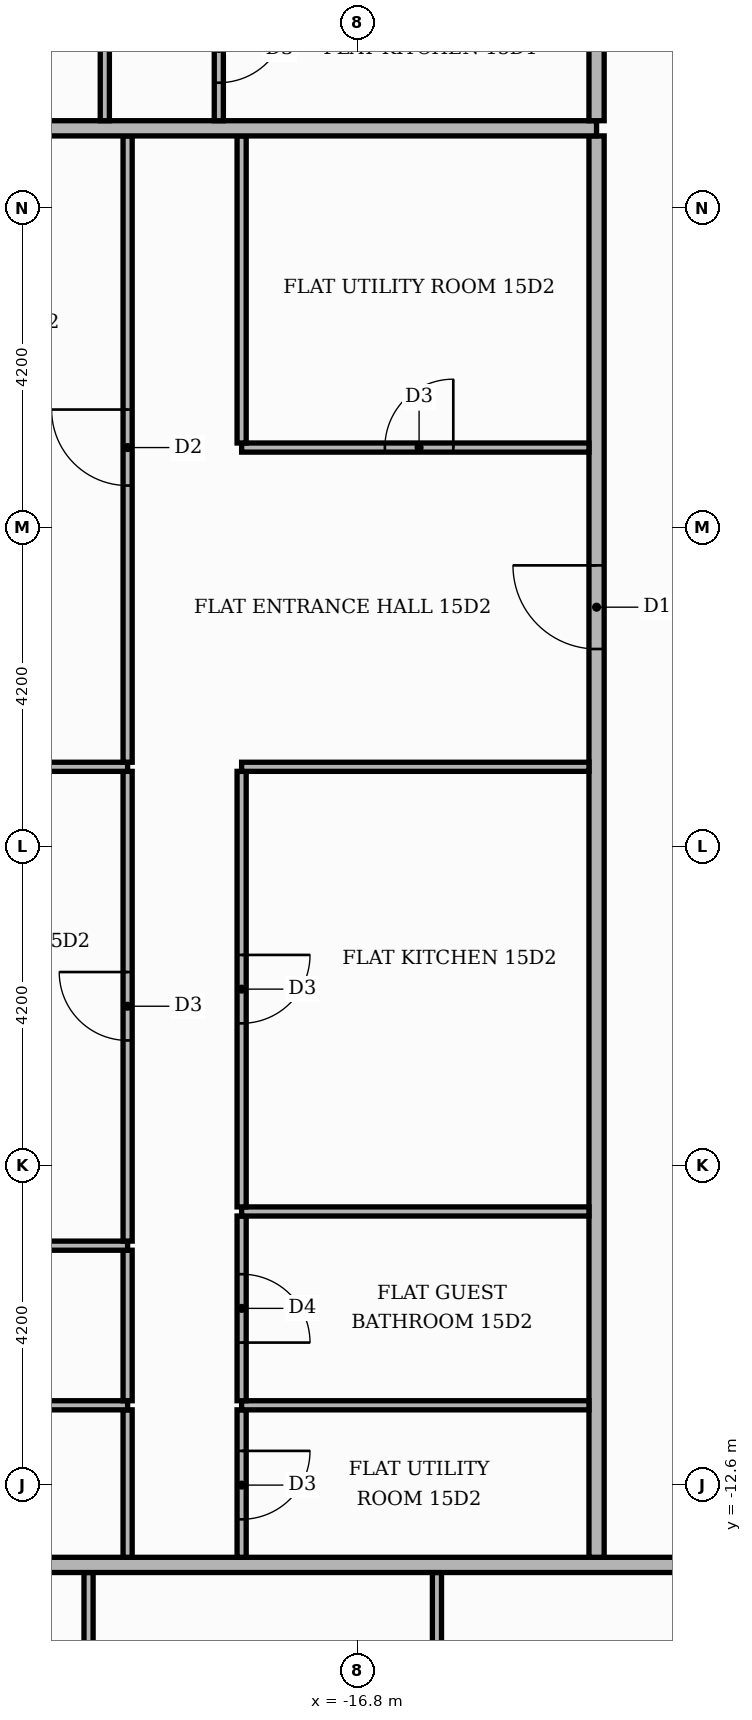
"""IFC4 building model, lengths in metres.
Left out: names, types, materials, properties, quantities, classifications, styles, units other than length and angle.
Written with IfcOpenShell. Run it as: python <this file> out.ifc"""

import sys

from ifc_helpers import new_model, si_unit, direction, frame, frame_2d, origin, place, context, subcontext, project, spatial, rectangle, extrude, element, fill, save


model = new_model("IFC4")
c1 = context("Model", 3, precision=1e-05, world=origin(), true_north=direction((0.0, 1.0)))
c2 = subcontext(c1, "Body", "Model", "MODEL_VIEW")
j1 = project(units=[si_unit("LENGTHUNIT", "METRE"), si_unit("PLANEANGLEUNIT", "RADIAN")], contexts=[c1])
p1 = place(None, origin())
s1 = spatial("IfcSite", under=j1, at=p1, CompositionType="ELEMENT")
p2 = place(p1, origin())
s2 = spatial("IfcBuilding", under=s1, at=p2, CompositionType="ELEMENT")
p3 = place(p2, frame((0.0, 0.0, 66.0)))
s3 = spatial("IfcBuildingStorey", under=s2, at=p3, CompositionType="ELEMENT", Elevation=66.0)
p4 = place(p3, frame((-20.334, -20.66, 0.0), z_axis=(0.0, 0.0, 1.0), x_axis=(0.0, 1.0, 0.0)))
e1 = element("IfcWall", 1, at=p4, inside=s3, PredefinedType="PARTITIONING", context=c2, shape_type="SweptSolid", body=[
    extrude(rectangle(XDim=6.91, YDim=0.12, at=frame_2d((3.455, 0.0))), origin(), (0.0, 0.0, 1.0), 3.48),
])
p5 = place(p4, frame((4.792, 0.0, 0.0)))
e2 = element("IfcOpeningElement", 2, at=p5, cuts=e1, PredefinedType="OPENING", context=c2, shape_type="SweptSolid", body=[
    extrude(rectangle(XDim=0.9, YDim=2.1, at=frame_2d((0.45, 1.05))), frame((0.0, 0.07, 0.0), z_axis=(0.0, -1.0, 0.0), x_axis=(1.0, 0.0, 0.0)), (0.0, 0.0, 1.0), 0.14),
])
p6 = place(p3, frame((-15.75, -20.66, 0.0), z_axis=(0.0, 0.0, 1.0), x_axis=(0.0, 1.0, 0.0)))
e3 = element("IfcWall", 3, at=p6, inside=s3, PredefinedType="PARTITIONING", context=c2, shape_type="SweptSolid", body=[
    extrude(rectangle(XDim=6.91, YDim=0.12, at=frame_2d((3.455, 0.0))), origin(), (0.0, 0.0, 1.0), 3.48),
])
p7 = place(p6, frame((2.975, 0.0, 0.0)))
e4 = element("IfcOpeningElement", 4, at=p7, cuts=e3, PredefinedType="OPENING", context=c2, shape_type="SweptSolid", body=[
    extrude(rectangle(XDim=1.0, YDim=2.1, at=frame_2d((0.5, 1.05))), frame((0.0, 0.07, 0.0), z_axis=(0.0, -1.0, 0.0), x_axis=(1.0, 0.0, 0.0)), (0.0, 0.0, 1.0), 0.14),
])
p8 = place(p3, frame((-25.42, -13.65, 0.0), z_axis=(0.0, 0.0, 1.0), x_axis=(1.0, 0.0, 0.0)))
e5 = element("IfcWall", 5, at=p8, inside=s3, PredefinedType="PARTITIONING", context=c2, shape_type="SweptSolid", body=[
    extrude(rectangle(XDim=39.07, YDim=0.2, at=frame_2d((19.535, 0.0))), origin(), (0.0, 0.0, 1.0), 3.48),
])
p9 = place(p8, frame((13.32, 0.0, 0.0)))
e6 = element("IfcOpeningElement", 6, at=p9, cuts=e5, PredefinedType="OPENING", context=c2, shape_type="SweptSolid", body=[
    extrude(rectangle(XDim=1.1, YDim=2.4, at=frame_2d((0.55, 1.2))), frame((0.0, 0.11, 0.0), z_axis=(0.0, -1.0, 0.0), x_axis=(1.0, 0.0, 0.0)), (0.0, 0.0, 1.0), 0.22),
])
p10 = place(p8, frame((21.72, 0.0, 0.0)))
e7 = element("IfcOpeningElement", 7, at=p10, cuts=e5, PredefinedType="OPENING", context=c2, shape_type="SweptSolid", body=[
    extrude(rectangle(XDim=1.1, YDim=2.4, at=frame_2d((0.55, 1.2))), frame((0.0, 0.11, 0.0), z_axis=(0.0, -1.0, 0.0), x_axis=(1.0, 0.0, 0.0)), (0.0, 0.0, 1.0), 0.22),
])
p11 = place(p3, frame((-19.82, -13.55, 0.0), z_axis=(0.0, 0.0, 1.0), x_axis=(0.0, 1.0, 0.0)))
e8 = element("IfcWall", 8, at=p11, inside=s3, PredefinedType="PARTITIONING", context=c2, shape_type="SweptSolid", body=[
    extrude(rectangle(XDim=1.94, YDim=0.12, at=frame_2d((0.97, 0.0))), origin(), (0.0, 0.0, 1.0), 3.48),
])
p12 = place(p3, frame((-18.32, -13.55, 0.0), z_axis=(0.0, 0.0, 1.0), x_axis=(0.0, 1.0, 0.0)))
e9 = element("IfcWall", 9, at=p12, inside=s3, PredefinedType="PARTITIONING", context=c2, shape_type="SweptSolid", body=[
    extrude(rectangle(XDim=1.94, YDim=0.12, at=frame_2d((0.97, 0.0))), origin(), (0.0, 0.0, 1.0), 3.48),
])
p13 = place(p12, frame((0.5, 0.0, 0.0)))
e10 = element("IfcOpeningElement", 10, at=p13, cuts=e9, PredefinedType="OPENING", context=c2, shape_type="SweptSolid", body=[
    extrude(rectangle(XDim=0.9, YDim=2.1, at=frame_2d((0.45, 1.05))), frame((0.0, 0.07, 0.0), z_axis=(0.0, -1.0, 0.0), x_axis=(1.0, 0.0, 0.0)), (0.0, 0.0, 1.0), 0.14),
])
p14 = place(p3, frame((-13.65, -13.55, 0.0), z_axis=(0.0, 0.0, 1.0), x_axis=(0.0, 1.0, 0.0)))
e11 = element("IfcWall", 11, at=p14, inside=s3, PredefinedType="PARTITIONING", context=c2, shape_type="SweptSolid", body=[
    extrude(rectangle(XDim=18.7, YDim=0.2, at=frame_2d((9.35, 0.0))), origin(), (0.0, 0.0, 1.0), 3.48),
])
p15 = place(p14, frame((11.95, 0.0, 0.0)))
e12 = element("IfcOpeningElement", 12, at=p15, cuts=e11, PredefinedType="OPENING", context=c2, shape_type="SweptSolid", body=[
    extrude(rectangle(XDim=1.1, YDim=2.4, at=frame_2d((0.55, 1.2))), frame((0.0, 0.11, 0.0), z_axis=(0.0, -1.0, 0.0), x_axis=(1.0, 0.0, 0.0)), (0.0, 0.0, 1.0), 0.22),
])
p16 = place(p3, frame((-25.42, -11.55, 0.0), z_axis=(0.0, 0.0, 1.0), x_axis=(1.0, 0.0, 0.0)))
e13 = element("IfcWall", 13, at=p16, inside=s3, PredefinedType="PARTITIONING", context=c2, shape_type="SweptSolid", body=[
    extrude(rectangle(XDim=5.6, YDim=0.12, at=frame_2d((2.8, 0.0))), origin(), (0.0, 0.0, 1.0), 3.48),
])
p17 = place(p16, frame((2.2, 0.0, 0.0)))
e14 = element("IfcOpeningElement", 14, at=p17, cuts=e13, PredefinedType="OPENING", context=c2, shape_type="SweptSolid", body=[
    extrude(rectangle(XDim=0.9, YDim=2.1, at=frame_2d((0.45, 1.05))), frame((0.0, 0.07, 0.0), z_axis=(0.0, -1.0, 0.0), x_axis=(1.0, 0.0, 0.0)), (0.0, 0.0, 1.0), 0.14),
])
p18 = place(p3, frame((-18.32, -11.55, 0.0), z_axis=(0.0, 0.0, 1.0), x_axis=(1.0, 0.0, 0.0)))
e15 = element("IfcWall", 15, at=p18, inside=s3, PredefinedType="PARTITIONING", context=c2, shape_type="SweptSolid", body=[
    extrude(rectangle(XDim=4.57, YDim=0.12, at=frame_2d((2.285, 0.0))), origin(), (0.0, 0.0, 1.0), 3.48),
])
p19 = place(p3, frame((-19.82, -11.49, 0.0), z_axis=(0.0, 0.0, 1.0), x_axis=(0.0, 1.0, 0.0)))
e16 = element("IfcWall", 16, at=p19, inside=s3, PredefinedType="PARTITIONING", context=c2, shape_type="SweptSolid", body=[
    extrude(rectangle(XDim=1.98, YDim=0.12, at=frame_2d((0.99, 0.0))), origin(), (0.0, 0.0, 1.0), 3.48),
])
p20 = place(p3, frame((-18.32, -11.49, 0.0), z_axis=(0.0, 0.0, 1.0), x_axis=(0.0, 1.0, 0.0)))
e17 = element("IfcWall", 17, at=p20, inside=s3, PredefinedType="PARTITIONING", context=c2, shape_type="SweptSolid", body=[
    extrude(rectangle(XDim=2.43, YDim=0.12, at=frame_2d((1.215, 0.0))), origin(), (0.0, 0.0, 1.0), 3.48),
])
p21 = place(p20, frame((0.765, 0.0, 0.0)))
e18 = element("IfcOpeningElement", 18, at=p21, cuts=e17, PredefinedType="OPENING", context=c2, shape_type="SweptSolid", body=[
    extrude(rectangle(XDim=0.9, YDim=2.1, at=frame_2d((0.45, 1.05))), frame((0.0, 0.07, 0.0), z_axis=(0.0, -1.0, 0.0), x_axis=(1.0, 0.0, 0.0)), (0.0, 0.0, 1.0), 0.14),
])
p22 = place(p3, frame((-25.42, -9.45, 0.0), z_axis=(0.0, 0.0, 1.0), x_axis=(1.0, 0.0, 0.0)))
e19 = element("IfcWall", 19, at=p22, inside=s3, PredefinedType="PARTITIONING", context=c2, shape_type="SweptSolid", body=[
    extrude(rectangle(XDim=5.6, YDim=0.12, at=frame_2d((2.8, 0.0))), origin(), (0.0, 0.0, 1.0), 3.48),
])
p23 = place(p22, frame((2.2, 0.0, 0.0)))
e20 = element("IfcOpeningElement", 20, at=p23, cuts=e19, PredefinedType="OPENING", context=c2, shape_type="SweptSolid", body=[
    extrude(rectangle(XDim=0.9, YDim=2.1, at=frame_2d((0.45, 1.05))), frame((0.0, 0.07, 0.0), z_axis=(0.0, -1.0, 0.0), x_axis=(1.0, 0.0, 0.0)), (0.0, 0.0, 1.0), 0.14),
])
p24 = place(p3, frame((-19.82, -9.39, 0.0), z_axis=(0.0, 0.0, 1.0), x_axis=(0.0, 1.0, 0.0)))
e21 = element("IfcWall", 21, at=p24, inside=s3, PredefinedType="PARTITIONING", context=c2, shape_type="SweptSolid", body=[
    extrude(rectangle(XDim=6.18, YDim=0.12, at=frame_2d((3.09, 0.0))), origin(), (0.0, 0.0, 1.0), 3.48),
])
p25 = place(p24, frame((2.64, 0.0, 0.0)))
e22 = element("IfcOpeningElement", 22, at=p25, cuts=e21, PredefinedType="OPENING", context=c2, shape_type="SweptSolid", body=[
    extrude(rectangle(XDim=0.9, YDim=2.1, at=frame_2d((0.45, 1.05))), frame((0.0, 0.07, 0.0), z_axis=(0.0, -1.0, 0.0), x_axis=(1.0, 0.0, 0.0)), (0.0, 0.0, 1.0), 0.14),
])
p26 = place(p3, frame((-18.32, -9.0, 0.0), z_axis=(0.0, 0.0, 1.0), x_axis=(1.0, 0.0, 0.0)))
e23 = element("IfcWall", 23, at=p26, inside=s3, PredefinedType="PARTITIONING", context=c2, shape_type="SweptSolid", body=[
    extrude(rectangle(XDim=4.57, YDim=0.12, at=frame_2d((2.285, 0.0))), origin(), (0.0, 0.0, 1.0), 3.48),
])
p27 = place(p3, frame((-18.32, -8.94, 0.0), z_axis=(0.0, 0.0, 1.0), x_axis=(0.0, 1.0, 0.0)))
e24 = element("IfcWall", 24, at=p27, inside=s3, PredefinedType="PARTITIONING", context=c2, shape_type="SweptSolid", body=[
    extrude(rectangle(XDim=5.73, YDim=0.12, at=frame_2d((2.865, 0.0))), origin(), (0.0, 0.0, 1.0), 3.48),
])
p28 = place(p27, frame((2.415, 0.0, 0.0)))
e25 = element("IfcOpeningElement", 25, at=p28, cuts=e24, PredefinedType="OPENING", context=c2, shape_type="SweptSolid", body=[
    extrude(rectangle(XDim=0.9, YDim=2.1, at=frame_2d((0.45, 1.05))), frame((0.0, 0.07, 0.0), z_axis=(0.0, -1.0, 0.0), x_axis=(1.0, 0.0, 0.0)), (0.0, 0.0, 1.0), 0.14),
])
p29 = place(p3, frame((-25.42, -3.15, 0.0), z_axis=(0.0, 0.0, 1.0), x_axis=(1.0, 0.0, 0.0)))
e26 = element("IfcWall", 26, at=p29, inside=s3, PredefinedType="PARTITIONING", context=c2, shape_type="SweptSolid", body=[
    extrude(rectangle(XDim=5.6, YDim=0.12, at=frame_2d((2.8, 0.0))), origin(), (0.0, 0.0, 1.0), 3.48),
])
p30 = place(p3, frame((-18.32, -3.15, 0.0), z_axis=(0.0, 0.0, 1.0), x_axis=(1.0, 0.0, 0.0)))
e27 = element("IfcWall", 27, at=p30, inside=s3, PredefinedType="PARTITIONING", context=c2, shape_type="SweptSolid", body=[
    extrude(rectangle(XDim=4.57, YDim=0.12, at=frame_2d((2.285, 0.0))), origin(), (0.0, 0.0, 1.0), 3.48),
])
p31 = place(p3, frame((-19.82, -3.09, 0.0), z_axis=(0.0, 0.0, 1.0), x_axis=(0.0, 1.0, 0.0)))
e28 = element("IfcWall", 28, at=p31, inside=s3, PredefinedType="PARTITIONING", context=c2, shape_type="SweptSolid", body=[
    extrude(rectangle(XDim=8.24, YDim=0.12, at=frame_2d((4.12, 0.0))), origin(), (0.0, 0.0, 1.0), 3.48),
])
p32 = place(p31, frame((3.64, 0.0, 0.0)))
e29 = element("IfcOpeningElement", 29, at=p32, cuts=e28, PredefinedType="OPENING", context=c2, shape_type="SweptSolid", body=[
    extrude(rectangle(XDim=1.0, YDim=2.1, at=frame_2d((0.5, 1.05))), frame((0.0, 0.07, 0.0), z_axis=(0.0, -1.0, 0.0), x_axis=(1.0, 0.0, 0.0)), (0.0, 0.0, 1.0), 0.14),
])
p33 = place(p3, frame((-18.32, 1.05, 0.0), z_axis=(0.0, 0.0, 1.0), x_axis=(1.0, 0.0, 0.0)))
e30 = element("IfcWall", 30, at=p33, inside=s3, PredefinedType="PARTITIONING", context=c2, shape_type="SweptSolid", body=[
    extrude(rectangle(XDim=4.57, YDim=0.12, at=frame_2d((2.285, 0.0))), origin(), (0.0, 0.0, 1.0), 3.48),
])
p34 = place(p33, frame((1.885, 0.0, 0.0)))
e31 = element("IfcOpeningElement", 31, at=p34, cuts=e30, PredefinedType="OPENING", context=c2, shape_type="SweptSolid", body=[
    extrude(rectangle(XDim=0.9, YDim=2.1, at=frame_2d((0.45, 1.05))), frame((0.0, 0.07, 0.0), z_axis=(0.0, -1.0, 0.0), x_axis=(1.0, 0.0, 0.0)), (0.0, 0.0, 1.0), 0.14),
])
p35 = place(p3, frame((-18.32, 1.11, 0.0), z_axis=(0.0, 0.0, 1.0), x_axis=(0.0, 1.0, 0.0)))
e32 = element("IfcWall", 32, at=p35, inside=s3, PredefinedType="PARTITIONING", context=c2, shape_type="SweptSolid", body=[
    extrude(rectangle(XDim=4.04, YDim=0.12, at=frame_2d((2.02, 0.0))), origin(), (0.0, 0.0, 1.0), 3.48),
])
p36 = place(p3, frame((-25.42, 5.25, 0.0), z_axis=(0.0, 0.0, 1.0), x_axis=(1.0, 0.0, 0.0)))
e33 = element("IfcWall", 33, at=p36, inside=s3, PredefinedType="PARTITIONING", context=c2, shape_type="SweptSolid", body=[
    extrude(rectangle(XDim=11.77, YDim=0.2, at=frame_2d((5.885, 0.0))), origin(), (0.0, 0.0, 1.0), 3.48),
])
p37 = place(p3, frame((-20.12, 5.35, 0.0), z_axis=(0.0, 0.0, 1.0), x_axis=(0.0, 1.0, 0.0)))
e34 = element("IfcWall", 34, at=p37, inside=s3, PredefinedType="PARTITIONING", context=c2, shape_type="SweptSolid", body=[
    extrude(rectangle(XDim=1.94, YDim=0.12, at=frame_2d((0.97, 0.0))), origin(), (0.0, 0.0, 1.0), 3.48),
])
p38 = place(p3, frame((-18.62, 5.35, 0.0), z_axis=(0.0, 0.0, 1.0), x_axis=(0.0, 1.0, 0.0)))
e35 = element("IfcWall", 35, at=p38, inside=s3, PredefinedType="PARTITIONING", context=c2, shape_type="SweptSolid", body=[
    extrude(rectangle(XDim=1.94, YDim=0.12, at=frame_2d((0.97, 0.0))), origin(), (0.0, 0.0, 1.0), 3.48),
])
p39 = place(p38, frame((0.5, 0.0, 0.0)))
e36 = element("IfcOpeningElement", 36, at=p39, cuts=e35, PredefinedType="OPENING", context=c2, shape_type="SweptSolid", body=[
    extrude(rectangle(XDim=0.9, YDim=2.1, at=frame_2d((0.45, 1.05))), frame((0.0, 0.07, 0.0), z_axis=(0.0, -1.0, 0.0), x_axis=(1.0, 0.0, 0.0)), (0.0, 0.0, 1.0), 0.14),
])
p40 = place(p3, frame((-13.65, 5.35, 0.0), z_axis=(0.0, 0.0, 1.0), x_axis=(0.0, 1.0, 0.0)))
e37 = element("IfcWall", 37, at=p40, inside=s3, PredefinedType="PARTITIONING", context=c2, shape_type="SweptSolid", body=[
    extrude(rectangle(XDim=8.2, YDim=0.2, at=frame_2d((4.1, 0.0))), origin(), (0.0, 0.0, 1.0), 3.48),
])
p41 = place(p40, frame((5.65, 0.0, 0.0)))
e38 = element("IfcOpeningElement", 38, at=p41, cuts=e37, PredefinedType="OPENING", context=c2, shape_type="SweptSolid", body=[
    extrude(rectangle(XDim=1.1, YDim=2.4, at=frame_2d((0.55, 1.2))), frame((0.0, 0.11, 0.0), z_axis=(0.0, -1.0, 0.0), x_axis=(1.0, 0.0, 0.0)), (0.0, 0.0, 1.0), 0.22),
])
p42 = place(p39, frame((0.9, 0.0, 0.0), z_axis=(0.0, 0.0, 1.0), x_axis=(-1.0, 0.0, 0.0)))
e39 = element("IfcDoor", 39, at=p42, inside=s3, OperationType="SINGLE_SWING_RIGHT", PredefinedType="DOOR", context=c2, shape_type="SweptSolid", body=[
    extrude(rectangle(XDim=0.9, YDim=2.1, at=frame_2d((0.45, 1.05))), frame((0.0, 0.025, 0.0), z_axis=(0.0, -1.0, 0.0), x_axis=(1.0, 0.0, 0.0)), (0.0, 0.0, 1.0), 0.05),
])
fill(e36, e39)
p43 = place(p15, origin())
e40 = element("IfcDoor", 40, at=p43, inside=s3, OperationType="SINGLE_SWING_RIGHT", PredefinedType="DOOR", context=c2, shape_type="SweptSolid", body=[
    extrude(rectangle(XDim=1.1, YDim=2.4, at=frame_2d((0.55, 1.2))), frame((0.0, 0.025, 0.0), z_axis=(0.0, -1.0, 0.0), x_axis=(1.0, 0.0, 0.0)), (0.0, 0.0, 1.0), 0.05),
])
fill(e12, e40)
p44 = place(p34, origin())
e41 = element("IfcDoor", 41, at=p44, inside=s3, OperationType="SINGLE_SWING_RIGHT", PredefinedType="DOOR", context=c2, shape_type="SweptSolid", body=[
    extrude(rectangle(XDim=0.9, YDim=2.1, at=frame_2d((0.45, 1.05))), frame((0.0, 0.025, 0.0), z_axis=(0.0, -1.0, 0.0), x_axis=(1.0, 0.0, 0.0)), (0.0, 0.0, 1.0), 0.05),
])
fill(e31, e41)
p45 = place(p28, frame((0.9, 0.0, 0.0), z_axis=(0.0, 0.0, 1.0), x_axis=(-1.0, 0.0, 0.0)))
e42 = element("IfcDoor", 42, at=p45, inside=s3, OperationType="SINGLE_SWING_RIGHT", PredefinedType="DOOR", context=c2, shape_type="SweptSolid", body=[
    extrude(rectangle(XDim=0.9, YDim=2.1, at=frame_2d((0.45, 1.05))), frame((0.0, 0.025, 0.0), z_axis=(0.0, -1.0, 0.0), x_axis=(1.0, 0.0, 0.0)), (0.0, 0.0, 1.0), 0.05),
])
fill(e25, e42)
p46 = place(p21, frame((0.9, 0.0, 0.0), z_axis=(0.0, 0.0, 1.0), x_axis=(-1.0, 0.0, 0.0)))
e43 = element("IfcDoor", 43, at=p46, inside=s3, OperationType="SINGLE_SWING_LEFT", PredefinedType="DOOR", context=c2, shape_type="SweptSolid", body=[
    extrude(rectangle(XDim=0.9, YDim=2.1, at=frame_2d((0.45, 1.05))), frame((0.0, 0.025, 0.0), z_axis=(0.0, -1.0, 0.0), x_axis=(1.0, 0.0, 0.0)), (0.0, 0.0, 1.0), 0.05),
])
fill(e18, e43)
p47 = place(p13, frame((0.9, 0.0, 0.0), z_axis=(0.0, 0.0, 1.0), x_axis=(-1.0, 0.0, 0.0)))
e44 = element("IfcDoor", 44, at=p47, inside=s3, OperationType="SINGLE_SWING_RIGHT", PredefinedType="DOOR", context=c2, shape_type="SweptSolid", body=[
    extrude(rectangle(XDim=0.9, YDim=2.1, at=frame_2d((0.45, 1.05))), frame((0.0, 0.025, 0.0), z_axis=(0.0, -1.0, 0.0), x_axis=(1.0, 0.0, 0.0)), (0.0, 0.0, 1.0), 0.05),
])
fill(e10, e44)
p48 = place(p32, origin())
e45 = element("IfcDoor", 45, at=p48, inside=s3, OperationType="SINGLE_SWING_RIGHT", PredefinedType="DOOR", context=c2, shape_type="SweptSolid", body=[
    extrude(rectangle(XDim=1.0, YDim=2.1, at=frame_2d((0.5, 1.05))), frame((0.0, 0.025, 0.0), z_axis=(0.0, -1.0, 0.0), x_axis=(1.0, 0.0, 0.0)), (0.0, 0.0, 1.0), 0.05),
])
fill(e29, e45)
p49 = place(p25, origin())
e46 = element("IfcDoor", 46, at=p49, inside=s3, OperationType="SINGLE_SWING_RIGHT", PredefinedType="DOOR", context=c2, shape_type="SweptSolid", body=[
    extrude(rectangle(XDim=0.9, YDim=2.1, at=frame_2d((0.45, 1.05))), frame((0.0, 0.025, 0.0), z_axis=(0.0, -1.0, 0.0), x_axis=(1.0, 0.0, 0.0)), (0.0, 0.0, 1.0), 0.05),
])
fill(e22, e46)
save(model, sys.argv[1])
